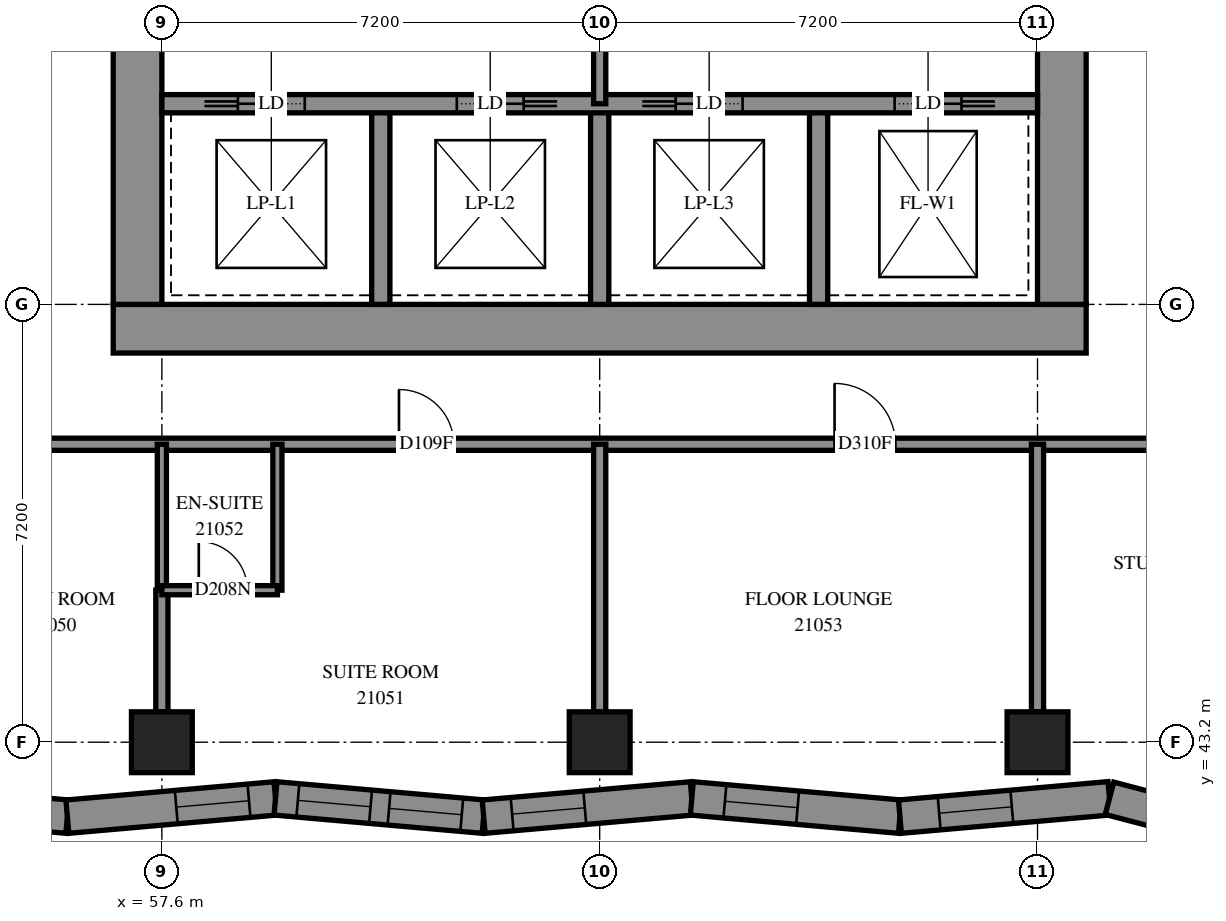
"""IFC4 building model, lengths in metres.
Left out: names, types, materials, properties, quantities, classifications, styles, units other than length and angle.
Written with IfcOpenShell. Run it as: python <this file> out.ifc"""

import sys

from ifc_helpers import new_model, si_unit, direction, frame, frame_2d, origin, origin_2d, place, context, subcontext, project, spatial, polyline, rectangle, outline, extrude, element, fill, save


model = new_model("IFC4")
c1 = context("Model", 3, precision=1e-05, world=origin(), true_north=direction((0.0, 1.0)))
c2 = subcontext(c1, "Body", "Model", "MODEL_VIEW")
j1 = project(units=[si_unit("LENGTHUNIT", "METRE"), si_unit("PLANEANGLEUNIT", "RADIAN")], contexts=[c1])
p1 = place(None, origin())
s1 = spatial("IfcSite", under=j1, at=p1, CompositionType="ELEMENT")
p2 = place(p1, origin())
s2 = spatial("IfcBuilding", under=s1, at=p2, CompositionType="ELEMENT")
p3 = place(p2, frame((0.0, 0.0, 81.2)))
s3 = spatial("IfcBuildingStorey", under=s2, at=p3, CompositionType="ELEMENT", Elevation=81.2)
for number, where, z_axis, x_axis in (
    (1, (57.6, 43.2, 0.0), (0.0, 0.0, 1.0), (1.0, 0.0, 0.0)),
    (2, (64.8, 43.2, 0.0), (0.0, 0.0, 1.0), (1.0, 0.0, 0.0)),
    (3, (72.0, 43.2, 0.0), (0.0, 0.0, 1.0), (1.0, 0.0, 0.0)),
):
    element("IfcColumn", number, at=place(p3, frame(where, z_axis=z_axis, x_axis=x_axis)), inside=s3, PredefinedType="COLUMN", context=c2, shape_type="SweptSolid", body=[
        extrude(rectangle(XDim=1.0, YDim=1.0, at=origin_2d()), origin(), (0.0, 0.0, 1.0), 3.1),
    ])
p4 = place(p3, frame((56.8, 50.0, -0.3), z_axis=(0.0, 0.0, 1.0), x_axis=(1.0, 0.0, 0.0)))
e4 = element("IfcWall", 4, at=p4, inside=s3, PredefinedType="SHEAR", context=c2, shape_type="SweptSolid", body=[
    extrude(rectangle(XDim=16.0, YDim=0.8, at=frame_2d((8.0, 0.0))), origin(), (0.0, 0.0, 1.0), 2.7),
])
p5 = place(p3, frame((57.2, 50.4, -0.3), z_axis=(0.0, 0.0, 1.0), x_axis=(0.0, 1.0, 0.0)))
e5 = element("IfcWall", 5, at=p5, inside=s3, PredefinedType="SHEAR", context=c2, shape_type="SweptSolid", body=[
    extrude(rectangle(XDim=14.4, YDim=0.8, at=frame_2d((7.2, 0.0))), origin(), (0.0, 0.0, 1.0), 2.7),
])
p6 = place(p5, frame((4.55, 0.0, 0.3)))
e6 = element("IfcOpeningElement", 6, at=p6, cuts=e5, PredefinedType="OPENING", context=c2, shape_type="SweptSolid", body=[
    extrude(rectangle(XDim=1.1, YDim=2.1, at=frame_2d((0.55, 1.05))), frame((0.0, 0.41, 0.0), z_axis=(0.0, -1.0, 0.0), x_axis=(1.0, 0.0, 0.0)), (0.0, 0.0, 1.0), 0.82),
])
p7 = place(p5, frame((11.35, 0.0, 0.3)))
e7 = element("IfcOpeningElement", 7, at=p7, cuts=e5, PredefinedType="OPENING", context=c2, shape_type="SweptSolid", body=[
    extrude(rectangle(XDim=1.1, YDim=2.1, at=frame_2d((0.55, 1.05))), frame((0.0, 0.41, 0.0), z_axis=(0.0, -1.0, 0.0), x_axis=(1.0, 0.0, 0.0)), (0.0, 0.0, 1.0), 0.82),
])
p8 = place(p3, frame((72.4, 50.4, -0.3), z_axis=(0.0, 0.0, 1.0), x_axis=(0.0, 1.0, 0.0)))
e8 = element("IfcWall", 8, at=p8, inside=s3, PredefinedType="SHEAR", context=c2, shape_type="SweptSolid", body=[
    extrude(rectangle(XDim=14.4, YDim=0.8, at=frame_2d((7.2, 0.0))), origin(), (0.0, 0.0, 1.0), 2.7),
])
p9 = place(p8, frame((4.55, 0.0, 0.3)))
e9 = element("IfcOpeningElement", 9, at=p9, cuts=e8, PredefinedType="OPENING", context=c2, shape_type="SweptSolid", body=[
    extrude(rectangle(XDim=1.1, YDim=2.1, at=frame_2d((0.55, 1.05))), frame((0.0, 0.41, 0.0), z_axis=(0.0, -1.0, 0.0), x_axis=(1.0, 0.0, 0.0)), (0.0, 0.0, 1.0), 0.82),
])
p10 = place(p8, frame((11.35, 0.0, 0.3)))
e10 = element("IfcOpeningElement", 10, at=p10, cuts=e8, PredefinedType="OPENING", context=c2, shape_type="SweptSolid", body=[
    extrude(rectangle(XDim=1.1, YDim=2.1, at=frame_2d((0.55, 1.05))), frame((0.0, 0.41, 0.0), z_axis=(0.0, -1.0, 0.0), x_axis=(1.0, 0.0, 0.0)), (0.0, 0.0, 1.0), 0.82),
])
for number, where, z_axis, x_axis in (
    (11, (61.2, 50.4, 0.0), (0.0, 0.0, 1.0), (0.0, 1.0, 0.0)),
    (12, (64.8, 50.4, 0.0), (0.0, 0.0, 1.0), (0.0, 1.0, 0.0)),
    (13, (68.4, 50.4, 0.0), (0.0, 0.0, 1.0), (0.0, 1.0, 0.0)),
):
    element("IfcWall", number, at=place(p3, frame(where, z_axis=z_axis, x_axis=x_axis)), inside=s3, PredefinedType="SOLIDWALL", context=c2, shape_type="SweptSolid", body=[
        extrude(rectangle(XDim=3.3, YDim=0.3, at=frame_2d((1.65, 0.0))), origin(), (0.0, 0.0, 1.0), 3.1),
    ])
p11 = place(p3, frame((57.6, 53.7, 0.0), z_axis=(0.0, 0.0, 1.0), x_axis=(1.0, 0.0, 0.0)))
e14 = element("IfcWall", 14, at=p11, inside=s3, PredefinedType="SOLIDWALL", context=c2, shape_type="SweptSolid", body=[
    extrude(rectangle(XDim=14.4, YDim=0.3, at=frame_2d((7.2, 0.0))), origin(), (0.0, 0.0, 1.0), 3.1),
])
p12 = place(p11, frame((1.25, 0.0, 0.0)))
e15 = element("IfcOpeningElement", 15, at=p12, cuts=e14, PredefinedType="OPENING", context=c2, shape_type="SweptSolid", body=[
    extrude(rectangle(XDim=1.1, YDim=2.1, at=frame_2d((0.55, 1.05))), frame((0.0, 0.16, 0.0), z_axis=(0.0, -1.0, 0.0), x_axis=(1.0, 0.0, 0.0)), (0.0, 0.0, 1.0), 0.32),
])
p13 = place(p11, frame((4.85, 0.0, 0.0)))
e16 = element("IfcOpeningElement", 16, at=p13, cuts=e14, PredefinedType="OPENING", context=c2, shape_type="SweptSolid", body=[
    extrude(rectangle(XDim=1.1, YDim=2.1, at=frame_2d((0.55, 1.05))), frame((0.0, 0.16, 0.0), z_axis=(0.0, -1.0, 0.0), x_axis=(1.0, 0.0, 0.0)), (0.0, 0.0, 1.0), 0.32),
])
p14 = place(p11, frame((8.45, 0.0, 0.0)))
e17 = element("IfcOpeningElement", 17, at=p14, cuts=e14, PredefinedType="OPENING", context=c2, shape_type="SweptSolid", body=[
    extrude(rectangle(XDim=1.1, YDim=2.1, at=frame_2d((0.55, 1.05))), frame((0.0, 0.16, 0.0), z_axis=(0.0, -1.0, 0.0), x_axis=(1.0, 0.0, 0.0)), (0.0, 0.0, 1.0), 0.32),
])
p15 = place(p11, frame((12.05, 0.0, 0.0)))
e18 = element("IfcOpeningElement", 18, at=p15, cuts=e14, PredefinedType="OPENING", context=c2, shape_type="SweptSolid", body=[
    extrude(rectangle(XDim=1.1, YDim=2.1, at=frame_2d((0.55, 1.05))), frame((0.0, 0.16, 0.0), z_axis=(0.0, -1.0, 0.0), x_axis=(1.0, 0.0, 0.0)), (0.0, 0.0, 1.0), 0.32),
])
p16 = place(p3, frame((52.599, 42.278, 0.0), z_axis=(0.0, 0.0, 1.0), x_axis=(0.9961831061, -0.0872881385, 0.0)))
e19 = element("IfcWall", 19, at=p16, inside=s3, PredefinedType="SOLIDWALL", context=c2, shape_type="SweptSolid", body=[
    extrude(outline(polyline([(0.048, -0.275), (3.484, -0.275), (3.436, 0.275), (-0.048, 0.275), (0.048, -0.275)])), origin(), (0.0, 0.0, 1.0), 3.1),
])
p17 = place(p16, frame((1.721, 0.0, 0.5)))
e20 = element("IfcOpeningElement", 20, at=p17, cuts=e19, PredefinedType="OPENING", context=c2, shape_type="SweptSolid", body=[
    extrude(rectangle(XDim=1.2, YDim=2.45, at=frame_2d((0.6, 1.225))), frame((0.0, 0.285, 0.0), z_axis=(0.0, -1.0, 0.0), x_axis=(1.0, 0.0, 0.0)), (0.0, 0.0, 1.0), 0.57),
])
p18 = place(p3, frame((56.046, 41.976, 0.0), z_axis=(0.0, 0.0, 1.0), x_axis=(0.996181166, 0.0873102778, 0.0)))
e21 = element("IfcWall", 21, at=p18, inside=s3, PredefinedType="SOLIDWALL", context=c2, shape_type="SweptSolid", body=[
    extrude(outline(polyline([(-0.024, -0.275), (3.412, -0.275), (3.46, 0.275), (0.024, 0.275), (-0.024, -0.275)])), origin(), (0.0, 0.0, 1.0), 3.1),
])
p19 = place(p18, frame((1.798, 0.0, 0.5)))
e22 = element("IfcOpeningElement", 22, at=p19, cuts=e21, PredefinedType="OPENING", context=c2, shape_type="SweptSolid", body=[
    extrude(rectangle(XDim=1.2, YDim=2.45, at=frame_2d((0.6, 1.225))), frame((0.0, 0.285, 0.0), z_axis=(0.0, -1.0, 0.0), x_axis=(1.0, 0.0, 0.0)), (0.0, 0.0, 1.0), 0.57),
])
p20 = place(p3, frame((59.469, 42.276, 0.0), z_axis=(0.0, 0.0, 1.0), x_axis=(0.996181166, -0.0873102778, 0.0)))
e23 = element("IfcWall", 23, at=p20, inside=s3, PredefinedType="SOLIDWALL", context=c2, shape_type="SweptSolid", body=[
    extrude(outline(polyline([(0.024, -0.275), (3.46, -0.275), (3.412, 0.275), (-0.024, 0.275), (0.024, -0.275)])), origin(), (0.0, 0.0, 1.0), 3.1),
])
p21 = place(p20, frame((0.369, 0.0, 0.5)))
e24 = element("IfcOpeningElement", 24, at=p21, cuts=e23, PredefinedType="OPENING", context=c2, shape_type="SweptSolid", body=[
    extrude(rectangle(XDim=1.2, YDim=2.45, at=frame_2d((0.6, 1.225))), frame((0.0, 0.285, 0.0), z_axis=(0.0, -1.0, 0.0), x_axis=(1.0, 0.0, 0.0)), (0.0, 0.0, 1.0), 0.57),
])
p22 = place(p20, frame((1.875, 0.0, 0.5)))
e25 = element("IfcOpeningElement", 25, at=p22, cuts=e23, PredefinedType="OPENING", context=c2, shape_type="SweptSolid", body=[
    extrude(rectangle(XDim=1.2, YDim=2.45, at=frame_2d((0.6, 1.225))), frame((0.0, 0.285, 0.0), z_axis=(0.0, -1.0, 0.0), x_axis=(1.0, 0.0, 0.0)), (0.0, 0.0, 1.0), 0.57),
])
p23 = place(p3, frame((62.892, 41.976, 0.0), z_axis=(0.0, 0.0, 1.0), x_axis=(0.9961809441, 0.0873128092, 0.0)))
e26 = element("IfcWall", 26, at=p23, inside=s3, PredefinedType="SOLIDWALL", context=c2, shape_type="SweptSolid", body=[
    extrude(outline(polyline([(-0.024, -0.275), (3.412, -0.275), (3.46, 0.275), (0.024, 0.275), (-0.024, -0.275)])), origin(), (0.0, 0.0, 1.0), 3.1),
])
p24 = place(p23, frame((0.47, 0.0, 0.5)))
e27 = element("IfcOpeningElement", 27, at=p24, cuts=e26, PredefinedType="OPENING", context=c2, shape_type="SweptSolid", body=[
    extrude(rectangle(XDim=1.2, YDim=2.45, at=frame_2d((0.6, 1.225))), frame((0.0, 0.285, 0.0), z_axis=(0.0, -1.0, 0.0), x_axis=(1.0, 0.0, 0.0)), (0.0, 0.0, 1.0), 0.57),
])
p25 = place(p3, frame((66.314, 42.276, 0.0), z_axis=(0.0, 0.0, 1.0), x_axis=(0.996181166, -0.0873102778, 0.0)))
e28 = element("IfcWall", 28, at=p25, inside=s3, PredefinedType="SOLIDWALL", context=c2, shape_type="SweptSolid", body=[
    extrude(outline(polyline([(0.024, -0.275), (3.46, -0.275), (3.412, 0.275), (-0.024, 0.275), (0.024, -0.275)])), origin(), (0.0, 0.0, 1.0), 3.1),
])
p26 = place(p25, frame((0.547, 0.0, 0.5)))
e29 = element("IfcOpeningElement", 29, at=p26, cuts=e28, PredefinedType="OPENING", context=c2, shape_type="SweptSolid", body=[
    extrude(rectangle(XDim=1.2, YDim=2.45, at=frame_2d((0.6, 1.225))), frame((0.0, 0.285, 0.0), z_axis=(0.0, -1.0, 0.0), x_axis=(1.0, 0.0, 0.0)), (0.0, 0.0, 1.0), 0.57),
])
p27 = place(p3, frame((69.737, 41.976, 0.0), z_axis=(0.0, 0.0, 1.0), x_axis=(0.9961831061, 0.0872881385, 0.0)))
e30 = element("IfcWall", 30, at=p27, inside=s3, PredefinedType="SOLIDWALL", context=c2, shape_type="SweptSolid", body=[
    extrude(outline(polyline([(-0.024, -0.275), (3.412, -0.275), (3.508, 0.275), (0.024, 0.275), (-0.024, -0.275)])), origin(), (0.0, 0.0, 1.0), 3.1),
])
p28 = place(p27, frame((0.648, 0.0, 0.5)))
e31 = element("IfcOpeningElement", 31, at=p28, cuts=e30, PredefinedType="OPENING", context=c2, shape_type="SweptSolid", body=[
    extrude(rectangle(XDim=1.2, YDim=2.45, at=frame_2d((0.6, 1.225))), frame((0.0, 0.285, 0.0), z_axis=(0.0, -1.0, 0.0), x_axis=(1.0, 0.0, 0.0)), (0.0, 0.0, 1.0), 0.57),
])
p29 = place(p3, frame((73.184, 42.278, 0.0), z_axis=(0.0, 0.0, 1.0), x_axis=(0.967125914, -0.2542979874, 0.0)))
e32 = element("IfcWall", 32, at=p29, inside=s3, PredefinedType="SOLIDWALL", context=c2, shape_type="SweptSolid", body=[
    extrude(outline(polyline([(0.048, -0.275), (3.587, -0.275), (3.671, 0.275), (-0.048, 0.275), (0.048, -0.275)])), origin(), (0.0, 0.0, 1.0), 3.1),
])
p30 = place(p29, frame((0.749, 0.0, 0.5)))
e33 = element("IfcOpeningElement", 33, at=p30, cuts=e32, PredefinedType="OPENING", context=c2, shape_type="SweptSolid", body=[
    extrude(rectangle(XDim=1.2, YDim=2.45, at=frame_2d((0.6, 1.225))), frame((0.0, 0.285, 0.0), z_axis=(0.0, -1.0, 0.0), x_axis=(1.0, 0.0, 0.0)), (0.0, 0.0, 1.0), 0.57),
])
p31 = place(p3, frame((64.8, 53.7, 0.0), z_axis=(0.0, 0.0, 1.0), x_axis=(0.0, 1.0, 0.0)))
e34 = element("IfcWall", 34, at=p31, inside=s3, PredefinedType="PARTITIONING", context=c2, shape_type="SweptSolid", body=[
    extrude(rectangle(XDim=3.6, YDim=0.2, at=frame_2d((1.8, 0.0))), origin(), (0.0, 0.0, 1.0), 3.1),
])
p32 = place(p3, frame((55.3, 48.1, 0.0), z_axis=(0.0, 0.0, 1.0), x_axis=(1.0, 0.0, 0.0)))
e35 = element("IfcWall", 35, at=p32, inside=s3, PredefinedType="PARTITIONING", context=c2, shape_type="SweptSolid", body=[
    extrude(rectangle(XDim=19.092, YDim=0.2, at=frame_2d((9.546, 0.0))), origin(), (0.0, 0.0, 1.0), 3.1),
])
p33 = place(p32, frame((6.199, 0.0, 0.0)))
e36 = element("IfcOpeningElement", 36, at=p33, cuts=e35, PredefinedType="OPENING", context=c2, shape_type="SweptSolid", body=[
    extrude(rectangle(XDim=0.9, YDim=2.1, at=frame_2d((0.45, 1.05))), frame((0.0, 0.11, 0.0), z_axis=(0.0, -1.0, 0.0), x_axis=(1.0, 0.0, 0.0)), (0.0, 0.0, 1.0), 0.22),
])
p34 = place(p32, frame((13.363, 0.0, 0.0)))
e37 = element("IfcOpeningElement", 37, at=p34, cuts=e35, PredefinedType="OPENING", context=c2, shape_type="SweptSolid", body=[
    extrude(rectangle(XDim=1.0, YDim=2.1, at=frame_2d((0.5, 1.05))), frame((0.0, 0.11, 0.0), z_axis=(0.0, -1.0, 0.0), x_axis=(1.0, 0.0, 0.0)), (0.0, 0.0, 1.0), 0.22),
])
for number, where, z_axis, x_axis in (
    (38, (64.8, 43.7, 0.0), (0.0, 0.0, 1.0), (0.0, 1.0, 0.0)),
    (39, (72.0, 43.7, 0.0), (0.0, 0.0, 1.0), (0.0, 1.0, 0.0)),
):
    element("IfcWall", number, at=place(p3, frame(where, z_axis=z_axis, x_axis=x_axis)), inside=s3, PredefinedType="PARTITIONING", context=c2, shape_type="SweptSolid", body=[
        extrude(rectangle(XDim=4.4, YDim=0.2, at=frame_2d((2.2, 0.0))), origin(), (0.0, 0.0, 1.0), 3.1),
    ])
for number, where, z_axis, x_axis in (
    (40, (59.5, 45.7, 0.0), (0.0, 0.0, 1.0), (0.0, 1.0, 0.0)),
    (41, (57.6, 45.7, 0.0), (0.0, 0.0, 1.0), (0.0, 1.0, 0.0)),
):
    element("IfcWall", number, at=place(p3, frame(where, z_axis=z_axis, x_axis=x_axis)), inside=s3, PredefinedType="PARTITIONING", context=c2, shape_type="SweptSolid", body=[
        extrude(rectangle(XDim=2.4, YDim=0.15, at=frame_2d((1.2, 0.0))), origin(), (0.0, 0.0, 1.0), 3.1),
    ])
p35 = place(p3, frame((57.6, 43.7, 0.0), z_axis=(0.0, 0.0, 1.0), x_axis=(0.0, 1.0, 0.0)))
e42 = element("IfcWall", 42, at=p35, inside=s3, PredefinedType="PARTITIONING", context=c2, shape_type="SweptSolid", body=[
    extrude(rectangle(XDim=2.0, YDim=0.2, at=frame_2d((1.0, 0.0))), origin(), (0.0, 0.0, 1.0), 3.1),
])
p36 = place(p3, frame((57.6, 45.7, 0.0), z_axis=(0.0, 0.0, 1.0), x_axis=(1.0, 0.0, 0.0)))
e43 = element("IfcWall", 43, at=p36, inside=s3, PredefinedType="PARTITIONING", context=c2, shape_type="SweptSolid", body=[
    extrude(rectangle(XDim=1.9, YDim=0.15, at=frame_2d((0.95, 0.0))), origin(), (0.0, 0.0, 1.0), 3.1),
])
p37 = place(p36, frame((0.607, 0.0, 0.0)))
e44 = element("IfcOpeningElement", 44, at=p37, cuts=e43, PredefinedType="OPENING", context=c2, shape_type="SweptSolid", body=[
    extrude(rectangle(XDim=0.8, YDim=2.1, at=frame_2d((0.4, 1.05))), frame((0.0, 0.085, 0.0), z_axis=(0.0, -1.0, 0.0), x_axis=(1.0, 0.0, 0.0)), (0.0, 0.0, 1.0), 0.17),
])
p38 = place(p19, origin())
e45 = element("IfcWindow", 45, at=p38, inside=s3, PartitioningType="SINGLE_PANEL", PredefinedType="WINDOW", context=c2, shape_type="SweptSolid", body=[
    extrude(rectangle(XDim=1.2, YDim=2.45, at=frame_2d((0.6, 1.225))), frame((0.0, 0.155, 0.0), z_axis=(0.0, -1.0, 0.0), x_axis=(1.0, 0.0, 0.0)), (0.0, 0.0, 1.0), 0.06),
])
fill(e22, e45)
p39 = place(p21, origin())
e46 = element("IfcWindow", 46, at=p39, inside=s3, PartitioningType="SINGLE_PANEL", PredefinedType="WINDOW", context=c2, shape_type="SweptSolid", body=[
    extrude(rectangle(XDim=1.2, YDim=2.45, at=frame_2d((0.6, 1.225))), frame((0.0, 0.155, 0.0), z_axis=(0.0, -1.0, 0.0), x_axis=(1.0, 0.0, 0.0)), (0.0, 0.0, 1.0), 0.06),
])
fill(e24, e46)
p40 = place(p22, origin())
e47 = element("IfcWindow", 47, at=p40, inside=s3, PartitioningType="SINGLE_PANEL", PredefinedType="WINDOW", context=c2, shape_type="SweptSolid", body=[
    extrude(rectangle(XDim=1.2, YDim=2.45, at=frame_2d((0.6, 1.225))), frame((0.0, 0.155, 0.0), z_axis=(0.0, -1.0, 0.0), x_axis=(1.0, 0.0, 0.0)), (0.0, 0.0, 1.0), 0.06),
])
fill(e25, e47)
p41 = place(p24, origin())
e48 = element("IfcWindow", 48, at=p41, inside=s3, PartitioningType="SINGLE_PANEL", PredefinedType="WINDOW", context=c2, shape_type="SweptSolid", body=[
    extrude(rectangle(XDim=1.2, YDim=2.45, at=frame_2d((0.6, 1.225))), frame((0.0, 0.155, 0.0), z_axis=(0.0, -1.0, 0.0), x_axis=(1.0, 0.0, 0.0)), (0.0, 0.0, 1.0), 0.06),
])
fill(e27, e48)
p42 = place(p26, origin())
e49 = element("IfcWindow", 49, at=p42, inside=s3, PartitioningType="SINGLE_PANEL", PredefinedType="WINDOW", context=c2, shape_type="SweptSolid", body=[
    extrude(rectangle(XDim=1.2, YDim=2.45, at=frame_2d((0.6, 1.225))), frame((0.0, 0.155, 0.0), z_axis=(0.0, -1.0, 0.0), x_axis=(1.0, 0.0, 0.0)), (0.0, 0.0, 1.0), 0.06),
])
fill(e29, e49)
p43 = place(p28, origin())
e50 = element("IfcWindow", 50, at=p43, inside=s3, PartitioningType="SINGLE_PANEL", PredefinedType="WINDOW", context=c2, shape_type="SweptSolid", body=[
    extrude(rectangle(XDim=1.2, YDim=2.45, at=frame_2d((0.6, 1.225))), frame((0.0, 0.155, 0.0), z_axis=(0.0, -1.0, 0.0), x_axis=(1.0, 0.0, 0.0)), (0.0, 0.0, 1.0), 0.06),
])
fill(e31, e50)
p44 = place(p12, origin())
e51 = element("IfcDoor", 51, at=p44, inside=s3, OperationType="SLIDING_TO_LEFT", PredefinedType="DOOR", context=c2, shape_type="SweptSolid", body=[
    extrude(rectangle(XDim=1.1, YDim=2.1, at=frame_2d((0.55, 1.05))), frame((0.0, 0.025, 0.0), z_axis=(0.0, -1.0, 0.0), x_axis=(1.0, 0.0, 0.0)), (0.0, 0.0, 1.0), 0.05),
])
fill(e15, e51)
p45 = place(p13, origin())
e52 = element("IfcDoor", 52, at=p45, inside=s3, OperationType="SLIDING_TO_RIGHT", PredefinedType="DOOR", context=c2, shape_type="SweptSolid", body=[
    extrude(rectangle(XDim=1.1, YDim=2.1, at=frame_2d((0.55, 1.05))), frame((0.0, 0.025, 0.0), z_axis=(0.0, -1.0, 0.0), x_axis=(1.0, 0.0, 0.0)), (0.0, 0.0, 1.0), 0.05),
])
fill(e16, e52)
p46 = place(p14, origin())
e53 = element("IfcDoor", 53, at=p46, inside=s3, OperationType="SLIDING_TO_LEFT", PredefinedType="DOOR", context=c2, shape_type="SweptSolid", body=[
    extrude(rectangle(XDim=1.1, YDim=2.1, at=frame_2d((0.55, 1.05))), frame((0.0, 0.025, 0.0), z_axis=(0.0, -1.0, 0.0), x_axis=(1.0, 0.0, 0.0)), (0.0, 0.0, 1.0), 0.05),
])
fill(e17, e53)
p47 = place(p15, origin())
e54 = element("IfcDoor", 54, at=p47, inside=s3, OperationType="SLIDING_TO_RIGHT", PredefinedType="DOOR", context=c2, shape_type="SweptSolid", body=[
    extrude(rectangle(XDim=1.1, YDim=2.1, at=frame_2d((0.55, 1.05))), frame((0.0, 0.025, 0.0), z_axis=(0.0, -1.0, 0.0), x_axis=(1.0, 0.0, 0.0)), (0.0, 0.0, 1.0), 0.05),
])
fill(e18, e54)
p48 = place(p33, origin())
e55 = element("IfcDoor", 55, at=p48, inside=s3, OperationType="SINGLE_SWING_LEFT", PredefinedType="DOOR", context=c2, shape_type="SweptSolid", body=[
    extrude(rectangle(XDim=0.9, YDim=2.1, at=frame_2d((0.45, 1.05))), frame((0.0, 0.025, 0.0), z_axis=(0.0, -1.0, 0.0), x_axis=(1.0, 0.0, 0.0)), (0.0, 0.0, 1.0), 0.05),
])
fill(e36, e55)
p49 = place(p37, origin())
e56 = element("IfcDoor", 56, at=p49, inside=s3, OperationType="SINGLE_SWING_RIGHT", PredefinedType="DOOR", context=c2, shape_type="SweptSolid", body=[
    extrude(rectangle(XDim=0.8, YDim=2.1, at=frame_2d((0.4, 1.05))), frame((0.0, 0.025, 0.0), z_axis=(0.0, -1.0, 0.0), x_axis=(1.0, 0.0, 0.0)), (0.0, 0.0, 1.0), 0.05),
])
fill(e44, e56)
p50 = place(p34, origin())
e57 = element("IfcDoor", 57, at=p50, inside=s3, OperationType="SINGLE_SWING_LEFT", PredefinedType="DOOR", context=c2, shape_type="SweptSolid", body=[
    extrude(rectangle(XDim=1.0, YDim=2.1, at=frame_2d((0.5, 1.05))), frame((0.0, 0.025, 0.0), z_axis=(0.0, -1.0, 0.0), x_axis=(1.0, 0.0, 0.0)), (0.0, 0.0, 1.0), 0.05),
])
fill(e37, e57)
save(model, sys.argv[1])
